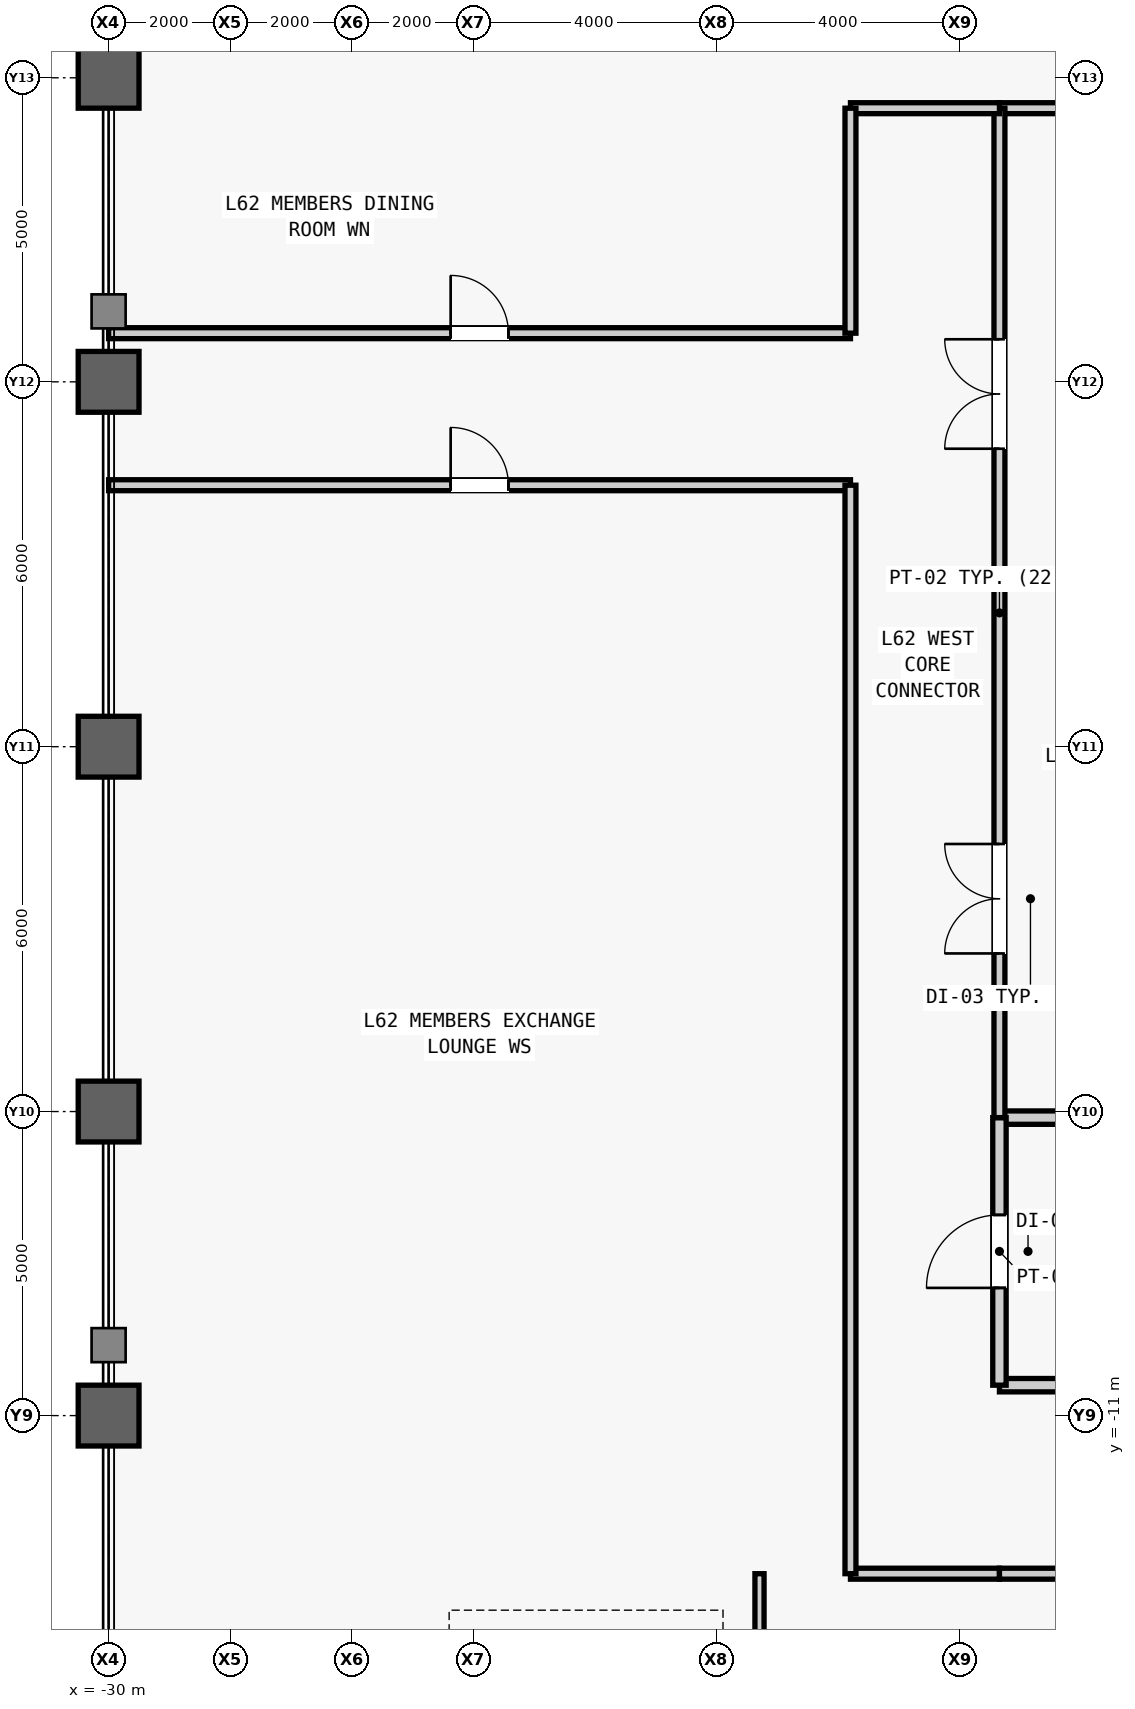
"""IFC4 building model, lengths in metres.
Left out: names, types, materials, properties, quantities, classifications, styles, units other than length and angle.
Written with IfcOpenShell. Run it as: python <this file> out.ifc"""

import sys

from ifc_helpers import new_model, si_unit, direction, frame, frame_2d, origin, origin_2d, place, context, subcontext, project, spatial, rectangle, hollow_rectangle, extrude, source, transform, mapped, element, fill, save


model = new_model("IFC4")
c1 = context("Model", 3, precision=1e-05, world=origin(), true_north=direction((0.0, 1.0)))
c2 = subcontext(c1, "Body", "Model", "MODEL_VIEW")
j1 = project(units=[si_unit("LENGTHUNIT", "METRE"), si_unit("PLANEANGLEUNIT", "RADIAN")], contexts=[c1])
p1 = place(None, origin())
s1 = spatial("IfcSite", under=j1, at=p1, CompositionType="ELEMENT")
p2 = place(p1, origin())
s2 = spatial("IfcBuilding", under=s1, at=p2, CompositionType="ELEMENT")
p3 = place(p2, frame((0.0, 0.0, 263.1)))
s3 = spatial("IfcBuildingStorey", under=s2, at=p3, CompositionType="ELEMENT", Elevation=263.1)
m1 = source(origin(), c2, "Body", "SweptSolid", [
    extrude(hollow_rectangle(XDim=1.0, YDim=1.0, WallThickness=0.055, at=origin_2d()), origin(), (0.0, 0.0, 1.0), 5.2),
])
for number, where, z_axis, x_axis in (
    (1, (-30.0, -11.0, 0.0), (0.0, 0.0, 1.0), (1.0, 0.0, 0.0)),
    (2, (-30.0, -6.0, 0.0), (0.0, 0.0, 1.0), (1.0, 0.0, 0.0)),
    (3, (-30.0, 0.0, 0.0), (0.0, 0.0, 1.0), (1.0, 0.0, 0.0)),
    (4, (-30.0, 6.0, 0.0), (0.0, 0.0, 1.0), (1.0, 0.0, 0.0)),
    (5, (-30.0, 11.0, 0.0), (0.0, 0.0, 1.0), (1.0, 0.0, 0.0)),
):
    element("IfcColumn", number, at=place(p3, frame(where, z_axis=z_axis, x_axis=x_axis)), inside=s3, PredefinedType="COLUMN", context=c2, shape_type="MappedRepresentation", body=[
        mapped(m1, transform((0.0, 0.0, 0.0), scale=1.0)),
    ])
m2 = source(origin(), c2, "Body", "SweptSolid", [
    extrude(rectangle(XDim=4.05, YDim=0.22, at=frame_2d((2.025, 0.0))), origin(), (0.0, 0.0, 1.0), 4.6),
])
p4 = place(p3, frame((-15.35, -10.5, 0.0), z_axis=(0.0, 0.0, 1.0), x_axis=(1.0, 0.0, 0.0)))
e6 = element("IfcWall", 6, at=p4, inside=s3, PredefinedType="PARTITIONING", context=c2, shape_type="MappedRepresentation", body=[
    mapped(m2, transform((0.0, 0.0, 0.0), scale=1.0)),
])
m3 = source(origin(), c2, "Body", "SweptSolid", [
    extrude(rectangle(XDim=4.05, YDim=0.22, at=frame_2d((2.025, 0.0))), origin(), (0.0, 0.0, 1.0), 2.8),
])
p5 = place(p3, frame((-15.35, -6.1, 0.0), z_axis=(0.0, 0.0, 1.0), x_axis=(1.0, 0.0, 0.0)))
e7 = element("IfcWall", 7, at=p5, inside=s3, PredefinedType="PARTITIONING", context=c2, shape_type="MappedRepresentation", body=[
    mapped(m3, transform((0.0, 0.0, 0.0), scale=1.0)),
])
m4 = source(origin(), c2, "Body", "SweptSolid", [
    extrude(rectangle(XDim=4.4, YDim=0.22, at=frame_2d((2.2, 0.0))), origin(), (0.0, 0.0, 1.0), 4.6),
])
p6 = place(p3, frame((-15.35, -10.5, 0.0), z_axis=(0.0, 0.0, 1.0), x_axis=(0.0, 1.0, 0.0)))
e8 = element("IfcWall", 8, at=p6, inside=s3, PredefinedType="PARTITIONING", context=c2, shape_type="MappedRepresentation", body=[
    mapped(m4, transform((0.0, 0.0, 0.0), scale=1.0)),
])
m5 = source(origin(), c2, "Body", "SweptSolid", [
    extrude(rectangle(XDim=1.2, YDim=2.2, at=frame_2d((0.6, 1.1))), frame((0.0, 0.12, 0.0), z_axis=(0.0, -1.0, 0.0), x_axis=(1.0, 0.0, 0.0)), (0.0, 0.0, 1.0), 0.24),
])
p7 = place(p6, frame((1.6, 0.0, 0.0)))
e9 = element("IfcOpeningElement", 9, at=p7, cuts=e8, PredefinedType="OPENING", context=c2, shape_type="MappedRepresentation", body=[
    mapped(m5, transform((0.0, 0.0, 0.0), scale=1.0)),
])
m6 = source(origin(), c2, "Body", "SweptSolid", [
    extrude(rectangle(XDim=4.05, YDim=0.18, at=frame_2d((2.025, 0.0))), origin(), (0.0, 0.0, 1.0), 4.6),
])
p8 = place(p3, frame((-15.35, 10.5, 0.0), z_axis=(0.0, 0.0, 1.0), x_axis=(1.0, 0.0, 0.0)))
e10 = element("IfcWall", 10, at=p8, inside=s3, PredefinedType="PARTITIONING", context=c2, shape_type="MappedRepresentation", body=[
    mapped(m6, transform((0.0, 0.0, 0.0), scale=1.0)),
])
m7 = source(origin(), c2, "Body", "SweptSolid", [
    extrude(rectangle(XDim=16.6, YDim=0.18, at=frame_2d((8.3, 0.0))), origin(), (0.0, 0.0, 1.0), 4.6),
])
p9 = place(p3, frame((-15.35, -6.1, 0.0), z_axis=(0.0, 0.0, 1.0), x_axis=(0.0, 1.0, 0.0)))
e11 = element("IfcWall", 11, at=p9, inside=s3, PredefinedType="PARTITIONING", context=c2, shape_type="MappedRepresentation", body=[
    mapped(m7, transform((0.0, 0.0, 0.0), scale=1.0)),
])
m8 = source(origin(), c2, "Body", "SweptSolid", [
    extrude(rectangle(XDim=1.8, YDim=2.25, at=frame_2d((0.9, 1.125))), frame((0.0, 0.1, 0.0), z_axis=(0.0, -1.0, 0.0), x_axis=(1.0, 0.0, 0.0)), (0.0, 0.0, 1.0), 0.2),
])
p10 = place(p9, frame((2.7, 0.0, 0.0)))
e12 = element("IfcOpeningElement", 12, at=p10, cuts=e11, PredefinedType="OPENING", context=c2, shape_type="MappedRepresentation", body=[
    mapped(m8, transform((0.0, 0.0, 0.0), scale=1.0)),
])
p11 = place(p9, frame((11.0, 0.0, 0.0)))
e13 = element("IfcOpeningElement", 13, at=p11, cuts=e11, PredefinedType="OPENING", context=c2, shape_type="MappedRepresentation", body=[
    mapped(m8, transform((0.0, 0.0, 0.0), scale=1.0)),
])
m9 = source(origin(), c2, "Body", "SweptSolid", [
    extrude(rectangle(XDim=2.45, YDim=0.18, at=frame_2d((1.225, 0.0))), origin(), (0.0, 0.0, 1.0), 4.6),
])
for number, where, z_axis, x_axis in (
    (14, (-17.8, 10.5, 0.0), (0.0, 0.0, 1.0), (1.0, 0.0, 0.0)),
    (15, (-17.8, -13.6, 0.0), (0.0, 0.0, 1.0), (1.0, 0.0, 0.0)),
):
    element("IfcWall", number, at=place(p3, frame(where, z_axis=z_axis, x_axis=x_axis)), inside=s3, PredefinedType="PARTITIONING", context=c2, shape_type="MappedRepresentation", body=[
        mapped(m9, transform((0.0, 0.0, 0.0), scale=1.0)),
    ])
m10 = source(origin(), c2, "Body", "SweptSolid", [
    extrude(rectangle(XDim=16.4, YDim=0.15, at=frame_2d((8.2, 0.0))), origin(), (0.0, 0.0, 1.0), 4.6),
])
p12 = place(p3, frame((-19.296, -30.0, 0.0), z_axis=(0.0, 0.0, 1.0), x_axis=(0.0, 1.0, 0.0)))
e16 = element("IfcWall", 16, at=p12, inside=s3, PredefinedType="PARTITIONING", context=c2, shape_type="MappedRepresentation", body=[
    mapped(m10, transform((0.0, 0.0, 0.0), scale=1.0)),
])
m11 = source(origin(), c2, "Body", "SweptSolid", [
    extrude(rectangle(XDim=0.95, YDim=2.15, at=frame_2d((0.475, 1.075))), frame((0.0, 0.085, 0.0), z_axis=(0.0, -1.0, 0.0), x_axis=(1.0, 0.0, 0.0)), (0.0, 0.0, 1.0), 0.17),
])
p13 = place(p12, frame((11.825, 0.0, 0.0)))
e17 = element("IfcOpeningElement", 17, at=p13, cuts=e16, PredefinedType="OPENING", context=c2, shape_type="MappedRepresentation", body=[
    mapped(m11, transform((0.0, 0.0, 0.0), scale=1.0)),
])
m12 = source(origin(), c2, "Body", "SweptSolid", [
    extrude(rectangle(XDim=2.75, YDim=0.18, at=frame_2d((1.375, 0.0))), origin(), (0.0, 0.0, 1.0), 4.6),
])
p14 = place(p3, frame((-15.35, -13.6, 0.0), z_axis=(0.0, 0.0, 1.0), x_axis=(1.0, 0.0, 0.0)))
e18 = element("IfcWall", 18, at=p14, inside=s3, PredefinedType="PARTITIONING", context=c2, shape_type="MappedRepresentation", body=[
    mapped(m12, transform((0.0, 0.0, 0.0), scale=1.0)),
])
m13 = source(origin(), c2, "Body", "SweptSolid", [
    extrude(rectangle(XDim=12.2, YDim=0.18, at=frame_2d((6.1, 0.0))), origin(), (0.0, 0.0, 1.0), 4.6),
])
p15 = place(p3, frame((-30.0, 4.3, 0.0), z_axis=(0.0, 0.0, 1.0), x_axis=(1.0, 0.0, 0.0)))
e19 = element("IfcWall", 19, at=p15, inside=s3, PredefinedType="PARTITIONING", context=c2, shape_type="MappedRepresentation", body=[
    mapped(m13, transform((0.0, 0.0, 0.0), scale=1.0)),
])
m14 = source(origin(), c2, "Body", "SweptSolid", [
    extrude(rectangle(XDim=0.95, YDim=2.15, at=frame_2d((0.475, 1.075))), frame((0.0, 0.1, 0.0), z_axis=(0.0, -1.0, 0.0), x_axis=(1.0, 0.0, 0.0)), (0.0, 0.0, 1.0), 0.2),
])
p16 = place(p15, frame((5.625, 0.0, 0.0)))
e20 = element("IfcOpeningElement", 20, at=p16, cuts=e19, PredefinedType="OPENING", context=c2, shape_type="MappedRepresentation", body=[
    mapped(m14, transform((0.0, 0.0, 0.0), scale=1.0)),
])
m15 = source(origin(), c2, "Body", "SweptSolid", [
    extrude(rectangle(XDim=17.9, YDim=0.18, at=frame_2d((8.95, 0.0))), origin(), (0.0, 0.0, 1.0), 4.6),
])
p17 = place(p3, frame((-17.8, -13.6, 0.0), z_axis=(0.0, 0.0, 1.0), x_axis=(0.0, 1.0, 0.0)))
e21 = element("IfcWall", 21, at=p17, inside=s3, PredefinedType="PARTITIONING", context=c2, shape_type="MappedRepresentation", body=[
    mapped(m15, transform((0.0, 0.0, 0.0), scale=1.0)),
])
p18 = place(p3, frame((-30.0, 6.8, 0.0), z_axis=(0.0, 0.0, 1.0), x_axis=(1.0, 0.0, 0.0)))
e22 = element("IfcWall", 22, at=p18, inside=s3, PredefinedType="PARTITIONING", context=c2, shape_type="MappedRepresentation", body=[
    mapped(m13, transform((0.0, 0.0, 0.0), scale=1.0)),
])
p19 = place(p18, frame((5.625, 0.0, 0.0)))
e23 = element("IfcOpeningElement", 23, at=p19, cuts=e22, PredefinedType="OPENING", context=c2, shape_type="MappedRepresentation", body=[
    mapped(m14, transform((0.0, 0.0, 0.0), scale=1.0)),
])
m16 = source(origin(), c2, "Body", "SweptSolid", [
    extrude(rectangle(XDim=3.7, YDim=0.18, at=frame_2d((1.85, 0.0))), origin(), (0.0, 0.0, 1.0), 4.6),
])
p20 = place(p3, frame((-17.8, 6.8, 0.0), z_axis=(0.0, 0.0, 1.0), x_axis=(0.0, 1.0, 0.0)))
e24 = element("IfcWall", 24, at=p20, inside=s3, PredefinedType="PARTITIONING", context=c2, shape_type="MappedRepresentation", body=[
    mapped(m16, transform((0.0, 0.0, 0.0), scale=1.0)),
])
m17 = source(origin(), c2, "Body", "SweptSolid", [
    extrude(rectangle(XDim=1.2, YDim=2.2, at=frame_2d((0.6, 1.1))), frame((0.0, 0.025, 0.0), z_axis=(0.0, -1.0, 0.0), x_axis=(1.0, 0.0, 0.0)), (0.0, 0.0, 1.0), 0.05),
])
p21 = place(p7, origin())
e25 = element("IfcDoor", 25, at=p21, inside=s3, OperationType="SINGLE_SWING_LEFT", PredefinedType="DOOR", context=c2, shape_type="MappedRepresentation", body=[
    mapped(m17, transform((0.0, 0.0, 0.0), scale=1.0)),
])
fill(e9, e25)
m18 = source(origin(), c2, "Body", "SweptSolid", [
    extrude(rectangle(XDim=1.8, YDim=2.25, at=frame_2d((0.9, 1.125))), frame((0.0, 0.025, 0.0), z_axis=(0.0, -1.0, 0.0), x_axis=(1.0, 0.0, 0.0)), (0.0, 0.0, 1.0), 0.05),
])
p22 = place(p10, origin())
e26 = element("IfcDoor", 26, at=p22, inside=s3, OperationType="SINGLE_SWING_LEFT", PredefinedType="DOOR", context=c2, shape_type="MappedRepresentation", body=[
    mapped(m18, transform((0.0, 0.0, 0.0), scale=1.0)),
])
fill(e12, e26)
p23 = place(p11, origin())
e27 = element("IfcDoor", 27, at=p23, inside=s3, OperationType="SINGLE_SWING_RIGHT", PredefinedType="DOOR", context=c2, shape_type="MappedRepresentation", body=[
    mapped(m18, transform((0.0, 0.0, 0.0), scale=1.0)),
])
fill(e13, e27)
m19 = source(origin(), c2, "Body", "SweptSolid", [
    extrude(rectangle(XDim=0.95, YDim=2.15, at=frame_2d((0.475, 1.075))), frame((0.0, 0.025, 0.0), z_axis=(0.0, -1.0, 0.0), x_axis=(1.0, 0.0, 0.0)), (0.0, 0.0, 1.0), 0.05),
])
p24 = place(p16, origin())
e28 = element("IfcDoor", 28, at=p24, inside=s3, OperationType="SINGLE_SWING_LEFT", PredefinedType="DOOR", context=c2, shape_type="MappedRepresentation", body=[
    mapped(m19, transform((0.0, 0.0, 0.0), scale=1.0)),
])
fill(e20, e28)
p25 = place(p19, origin())
e29 = element("IfcDoor", 29, at=p25, inside=s3, OperationType="SINGLE_SWING_LEFT", PredefinedType="DOOR", context=c2, shape_type="MappedRepresentation", body=[
    mapped(m19, transform((0.0, 0.0, 0.0), scale=1.0)),
])
fill(e23, e29)
save(model, sys.argv[1])
